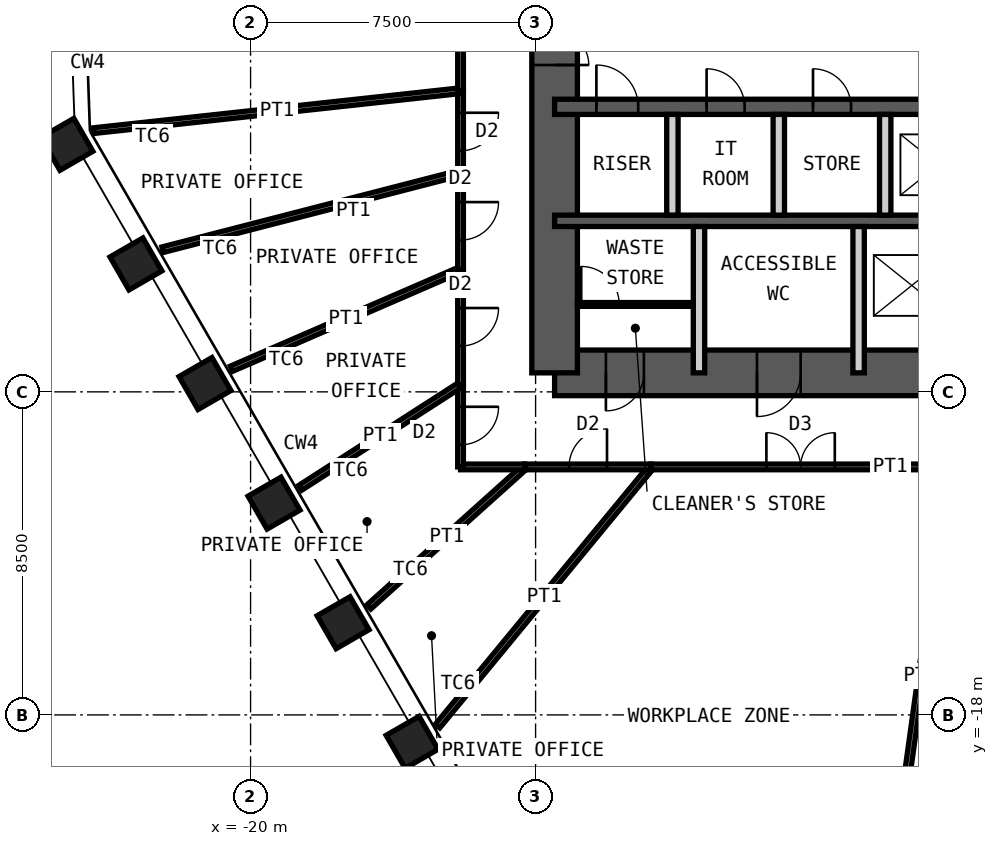
"""IFC4 building model, lengths in metres.
Left out: names, types, materials, properties, quantities, classifications, styles, units other than length and angle.
Written with IfcOpenShell. Run it as: python <this file> out.ifc"""

import sys

from ifc_helpers import new_model, si_unit, direction, frame, frame_2d, origin, origin_2d, place, context, subcontext, project, spatial, rectangle, hollow_rectangle, extrude, element, fill, save


model = new_model("IFC4")
c1 = context("Model", 3, precision=1e-05, world=origin(), true_north=direction((0.0, 1.0)))
c2 = subcontext(c1, "Body", "Model", "MODEL_VIEW")
j1 = project(units=[si_unit("LENGTHUNIT", "METRE"), si_unit("PLANEANGLEUNIT", "RADIAN")], contexts=[c1])
p1 = place(None, origin())
s1 = spatial("IfcSite", under=j1, at=p1, CompositionType="ELEMENT")
p2 = place(p1, origin())
s2 = spatial("IfcBuilding", under=s1, at=p2, CompositionType="ELEMENT")
p3 = place(p2, frame((0.0, 0.0, 235.0)))
s3 = spatial("IfcBuildingStorey", under=s2, at=p3, CompositionType="ELEMENT", Elevation=235.0)
for number, where, z_axis, x_axis in (
    (1, (-15.749, -18.721, 0.0), (0.0, 0.0, 1.0), (0.5, -0.866, 0.0)),
    (2, (-17.566, -15.574, 0.0), (0.0, 0.0, 1.0), (0.5, -0.866, 0.0)),
    (3, (-19.383, -12.428, 0.0), (0.0, 0.0, 1.0), (0.5, -0.866, 0.0)),
    (4, (-21.2, -9.281, 0.0), (0.0, 0.0, 1.0), (0.5, -0.866, 0.0)),
    (5, (-23.016, -6.134, 0.0), (0.0, 0.0, 1.0), (0.5, -0.866, 0.0)),
    (6, (-24.833, -2.988, 0.0), (0.0, 0.0, 1.0), (0.5, -0.866, 0.0)),
):
    element("IfcColumn", number, at=place(p3, frame(where, z_axis=z_axis, x_axis=x_axis)), inside=s3, PredefinedType="COLUMN", context=c2, shape_type="SweptSolid", body=[
        extrude(hollow_rectangle(XDim=1.0, YDim=1.0, WallThickness=0.06, at=origin_2d()), origin(), (0.0, 0.0, 1.0), 4.2),
    ])
p4 = place(p3, frame((-12.0, -9.0, 0.0), z_axis=(0.0, 0.0, 1.0), x_axis=(1.0, 0.0, 0.0)))
e7 = element("IfcWall", 7, at=p4, inside=s3, PredefinedType="SHEAR", context=c2, shape_type="SweptSolid", body=[
    extrude(rectangle(XDim=24.0, YDim=1.2, at=frame_2d((12.0, 0.0))), origin(), (0.0, 0.0, 1.0), 4.2),
])
p5 = place(p4, frame((1.35, 0.0, 0.0)))
e8 = element("IfcOpeningElement", 8, at=p5, cuts=e7, PredefinedType="OPENING", context=c2, shape_type="SweptSolid", body=[
    extrude(rectangle(XDim=1.0, YDim=2.1, at=frame_2d((0.5, 1.05))), frame((0.0, 0.61, 0.0), z_axis=(0.0, -1.0, 0.0), x_axis=(1.0, 0.0, 0.0)), (0.0, 0.0, 1.0), 1.22),
])
p6 = place(p4, frame((5.325, 0.0, 0.0)))
e9 = element("IfcOpeningElement", 9, at=p6, cuts=e7, PredefinedType="OPENING", context=c2, shape_type="SweptSolid", body=[
    extrude(rectangle(XDim=1.15, YDim=2.1, at=frame_2d((0.575, 1.05))), frame((0.0, 0.61, 0.0), z_axis=(0.0, -1.0, 0.0), x_axis=(1.0, 0.0, 0.0)), (0.0, 0.0, 1.0), 1.22),
])
p7 = place(p4, frame((12.6, 0.0, 0.0)))
e10 = element("IfcOpeningElement", 10, at=p7, cuts=e7, PredefinedType="OPENING", context=c2, shape_type="SweptSolid", body=[
    extrude(rectangle(XDim=1.0, YDim=2.1, at=frame_2d((0.5, 1.05))), frame((0.0, 0.61, 0.0), z_axis=(0.0, -1.0, 0.0), x_axis=(1.0, 0.0, 0.0)), (0.0, 0.0, 1.0), 1.22),
])
p8 = place(p3, frame((-12.0, -9.0, 0.0), z_axis=(0.0, 0.0, 1.0), x_axis=(0.0, 1.0, 0.0)))
e11 = element("IfcWall", 11, at=p8, inside=s3, PredefinedType="SHEAR", context=c2, shape_type="SweptSolid", body=[
    extrude(rectangle(XDim=18.0, YDim=1.2, at=frame_2d((9.0, 0.0))), origin(), (0.0, 0.0, 1.0), 4.2),
])
p9 = place(p8, frame((8.1, 0.0, 0.0)))
e12 = element("IfcOpeningElement", 12, at=p9, cuts=e11, PredefinedType="OPENING", context=c2, shape_type="SweptSolid", body=[
    extrude(rectangle(XDim=1.8, YDim=2.1, at=frame_2d((0.9, 1.05))), frame((0.0, 0.61, 0.0), z_axis=(0.0, -1.0, 0.0), x_axis=(1.0, 0.0, 0.0)), (0.0, 0.0, 1.0), 1.22),
])
p10 = place(p3, frame((-12.0, -2.0, 0.0), z_axis=(0.0, 0.0, 1.0), x_axis=(1.0, 0.0, 0.0)))
e13 = element("IfcWall", 13, at=p10, inside=s3, PredefinedType="SHEAR", context=c2, shape_type="SweptSolid", body=[
    extrude(rectangle(XDim=24.0, YDim=0.4, at=frame_2d((12.0, 0.0))), origin(), (0.0, 0.0, 1.0), 4.2),
])
p11 = place(p10, frame((1.1, 0.0, 0.0)))
e14 = element("IfcOpeningElement", 14, at=p11, cuts=e13, PredefinedType="OPENING", context=c2, shape_type="SweptSolid", body=[
    extrude(rectangle(XDim=1.1, YDim=2.1, at=frame_2d((0.55, 1.05))), frame((0.0, 0.21, 0.0), z_axis=(0.0, -1.0, 0.0), x_axis=(1.0, 0.0, 0.0)), (0.0, 0.0, 1.0), 0.42),
])
p12 = place(p10, frame((13.55, 0.0, 0.0)))
e15 = element("IfcOpeningElement", 15, at=p12, cuts=e13, PredefinedType="OPENING", context=c2, shape_type="SweptSolid", body=[
    extrude(rectangle(XDim=1.1, YDim=2.1, at=frame_2d((0.55, 1.05))), frame((0.0, 0.21, 0.0), z_axis=(0.0, -1.0, 0.0), x_axis=(1.0, 0.0, 0.0)), (0.0, 0.0, 1.0), 0.42),
])
p13 = place(p10, frame((20.7, 0.0, 0.0)))
e16 = element("IfcOpeningElement", 16, at=p13, cuts=e13, PredefinedType="OPENING", context=c2, shape_type="SweptSolid", body=[
    extrude(rectangle(XDim=1.1, YDim=2.1, at=frame_2d((0.55, 1.05))), frame((0.0, 0.21, 0.0), z_axis=(0.0, -1.0, 0.0), x_axis=(1.0, 0.0, 0.0)), (0.0, 0.0, 1.0), 0.42),
])
p14 = place(p10, frame((4.0, 0.0, 0.0)))
e17 = element("IfcOpeningElement", 17, at=p14, cuts=e13, PredefinedType="OPENING", context=c2, shape_type="SweptSolid", body=[
    extrude(rectangle(XDim=1.0, YDim=2.1, at=frame_2d((0.5, 1.05))), frame((0.0, 0.21, 0.0), z_axis=(0.0, -1.0, 0.0), x_axis=(1.0, 0.0, 0.0)), (0.0, 0.0, 1.0), 0.42),
])
p15 = place(p10, frame((6.8, 0.0, 0.0)))
e18 = element("IfcOpeningElement", 18, at=p15, cuts=e13, PredefinedType="OPENING", context=c2, shape_type="SweptSolid", body=[
    extrude(rectangle(XDim=1.0, YDim=2.1, at=frame_2d((0.5, 1.05))), frame((0.0, 0.21, 0.0), z_axis=(0.0, -1.0, 0.0), x_axis=(1.0, 0.0, 0.0)), (0.0, 0.0, 1.0), 0.42),
])
p16 = place(p3, frame((-12.0, -5.0, 0.0), z_axis=(0.0, 0.0, 1.0), x_axis=(1.0, 0.0, 0.0)))
e19 = element("IfcWall", 19, at=p16, inside=s3, PredefinedType="SHEAR", context=c2, shape_type="SweptSolid", body=[
    extrude(rectangle(XDim=24.0, YDim=0.3, at=frame_2d((12.0, 0.0))), origin(), (0.0, 0.0, 1.0), 4.2),
])
for number, where, z_axis, x_axis in (
    (20, (-8.9, -4.85, 0.0), (0.0, 0.0, 1.0), (0.0, 1.0, 0.0)),
    (21, (-6.1, -4.85, 0.0), (0.0, 0.0, 1.0), (0.0, 1.0, 0.0)),
    (22, (-3.3, -4.85, 0.0), (0.0, 0.0, 1.0), (0.0, 1.0, 0.0)),
):
    element("IfcWall", number, at=place(p3, frame(where, z_axis=z_axis, x_axis=x_axis)), inside=s3, PredefinedType="PARTITIONING", context=c2, shape_type="SweptSolid", body=[
        extrude(rectangle(XDim=2.65, YDim=0.3, at=frame_2d((1.325, 0.0))), origin(), (0.0, 0.0, 1.0), 3.98),
    ])
for number, where, z_axis, x_axis in (
    (23, (-8.2, -9.0, 0.0), (0.0, 0.0, 1.0), (0.0, 1.0, 0.0)),
    (24, (-4.0, -9.0, 0.0), (0.0, 0.0, 1.0), (0.0, 1.0, 0.0)),
):
    element("IfcWall", number, at=place(p3, frame(where, z_axis=z_axis, x_axis=x_axis)), inside=s3, PredefinedType="PARTITIONING", context=c2, shape_type="SweptSolid", body=[
        extrude(rectangle(XDim=3.85, YDim=0.3, at=frame_2d((1.925, 0.0))), origin(), (0.0, 0.0, 1.0), 3.98),
    ])
p17 = place(p3, frame((-11.4, -7.2, 0.0), z_axis=(0.0, 0.0, 1.0), x_axis=(1.0, 0.0, 0.0)))
e25 = element("IfcWall", 25, at=p17, inside=s3, PredefinedType="PARTITIONING", context=c2, shape_type="SweptSolid", body=[
    extrude(rectangle(XDim=3.05, YDim=0.1, at=frame_2d((1.525, 0.0))), origin(), (0.0, 0.0, 1.0), 3.98),
])
p18 = place(p17, frame((0.1, 0.0, 0.0)))
e26 = element("IfcOpeningElement", 26, at=p18, cuts=e25, PredefinedType="OPENING", context=c2, shape_type="SweptSolid", body=[
    extrude(rectangle(XDim=1.0, YDim=2.4, at=frame_2d((0.5, 1.2))), frame((0.0, 0.06, 0.0), z_axis=(0.0, -1.0, 0.0), x_axis=(1.0, 0.0, 0.0)), (0.0, 0.0, 1.0), 0.12),
])
p19 = place(p3, frame((-15.08, -18.294, 0.0), z_axis=(0.0, 0.0, 1.0), x_axis=(0.636052894953, 0.771645459277, 0.0)))
e27 = element("IfcWall", 27, at=p19, inside=s3, PredefinedType="PARTITIONING", context=c2, shape_type="SweptSolid", body=[
    extrude(rectangle(XDim=8.837, YDim=0.15, at=frame_2d((4.418, 0.0))), origin(), (0.0, 0.0, 1.0), 3.43),
])
p20 = place(p3, frame((-9.459, -11.475, 0.0), z_axis=(0.0, 0.0, 1.0), x_axis=(-1.0, 0.0, 0.0)))
e28 = element("IfcWall", 28, at=p20, inside=s3, PredefinedType="PARTITIONING", context=c2, shape_type="SweptSolid", body=[
    extrude(rectangle(XDim=3.324, YDim=0.15, at=frame_2d((1.662, 0.0))), origin(), (0.0, 0.0, 1.0), 4.03),
])
p21 = place(p20, frame((1.162, 0.0, 0.0)))
e29 = element("IfcOpeningElement", 29, at=p21, cuts=e28, PredefinedType="OPENING", context=c2, shape_type="SweptSolid", body=[
    extrude(rectangle(XDim=1.0, YDim=2.4, at=frame_2d((0.5, 1.2))), frame((0.0, 0.085, 0.0), z_axis=(0.0, -1.0, 0.0), x_axis=(1.0, 0.0, 0.0)), (0.0, 0.0, 1.0), 0.17),
])
p22 = place(p3, frame((-16.885, -15.158, 0.0), z_axis=(0.0, 0.0, 1.0), x_axis=(0.744165513773, 0.667995275515, 0.0)))
e30 = element("IfcWall", 30, at=p22, inside=s3, PredefinedType="PARTITIONING", context=c2, shape_type="SweptSolid", body=[
    extrude(rectangle(XDim=5.513, YDim=0.15, at=frame_2d((2.756, 0.0))), origin(), (0.0, 0.0, 1.0), 3.43),
])
p23 = place(p3, frame((-12.783, -11.475, 0.0), z_axis=(0.0, 0.0, 1.0), x_axis=(-1.0, 0.0, 0.0)))
e31 = element("IfcWall", 31, at=p23, inside=s3, PredefinedType="PARTITIONING", context=c2, shape_type="SweptSolid", body=[
    extrude(rectangle(XDim=1.692, YDim=0.15, at=frame_2d((0.846, 0.0))), origin(), (0.0, 0.0, 1.0), 4.03),
])
p24 = place(p3, frame((-14.475, -11.475, 0.0), z_axis=(0.0, 0.0, 1.0), x_axis=(0.0, 1.0, 0.0)))
e32 = element("IfcWall", 32, at=p24, inside=s3, PredefinedType="PARTITIONING", context=c2, shape_type="SweptSolid", body=[
    extrude(rectangle(XDim=2.164, YDim=0.15, at=frame_2d((1.082, 0.0))), origin(), (0.0, 0.0, 1.0), 4.03),
])
p25 = place(p24, frame((0.582, 0.0, 0.0)))
e33 = element("IfcOpeningElement", 33, at=p25, cuts=e32, PredefinedType="OPENING", context=c2, shape_type="SweptSolid", body=[
    extrude(rectangle(XDim=1.0, YDim=2.4, at=frame_2d((0.5, 1.2))), frame((0.0, 0.085, 0.0), z_axis=(0.0, -1.0, 0.0), x_axis=(1.0, 0.0, 0.0)), (0.0, 0.0, 1.0), 0.17),
])
p26 = place(p3, frame((-18.693, -12.024, 0.0), z_axis=(0.0, 0.0, 1.0), x_axis=(0.841031335058, 0.540986407824, 0.0)))
e34 = element("IfcWall", 34, at=p26, inside=s3, PredefinedType="PARTITIONING", context=c2, shape_type="SweptSolid", body=[
    extrude(rectangle(XDim=5.015, YDim=0.15, at=frame_2d((2.507, 0.0))), origin(), (0.0, 0.0, 1.0), 3.43),
])
p27 = place(p3, frame((-14.475, -9.311, 0.0), z_axis=(0.0, 0.0, 1.0), x_axis=(0.0, 1.0, 0.0)))
e35 = element("IfcWall", 35, at=p27, inside=s3, PredefinedType="PARTITIONING", context=c2, shape_type="SweptSolid", body=[
    extrude(rectangle(XDim=3.033, YDim=0.15, at=frame_2d((1.517, 0.0))), origin(), (0.0, 0.0, 1.0), 4.03),
])
p28 = place(p27, frame((1.017, 0.0, 0.0)))
e36 = element("IfcOpeningElement", 36, at=p28, cuts=e35, PredefinedType="OPENING", context=c2, shape_type="SweptSolid", body=[
    extrude(rectangle(XDim=1.0, YDim=2.4, at=frame_2d((0.5, 1.2))), frame((0.0, 0.085, 0.0), z_axis=(0.0, -1.0, 0.0), x_axis=(1.0, 0.0, 0.0)), (0.0, 0.0, 1.0), 0.17),
])
p29 = place(p3, frame((-20.502, -8.891, 0.0), z_axis=(0.0, 0.0, 1.0), x_axis=(0.917431289744, 0.397894242982, 0.0)))
e37 = element("IfcWall", 37, at=p29, inside=s3, PredefinedType="PARTITIONING", context=c2, shape_type="SweptSolid", body=[
    extrude(rectangle(XDim=6.569, YDim=0.15, at=frame_2d((3.285, 0.0))), origin(), (0.0, 0.0, 1.0), 3.43),
])
p30 = place(p3, frame((-14.475, -6.278, 0.0), z_axis=(0.0, 0.0, 1.0), x_axis=(0.0, 1.0, 0.0)))
e38 = element("IfcWall", 38, at=p30, inside=s3, PredefinedType="PARTITIONING", context=c2, shape_type="SweptSolid", body=[
    extrude(rectangle(XDim=2.542, YDim=0.15, at=frame_2d((1.271, 0.0))), origin(), (0.0, 0.0, 1.0), 4.03),
])
p31 = place(p30, frame((0.771, 0.0, 0.0)))
e39 = element("IfcOpeningElement", 39, at=p31, cuts=e38, PredefinedType="OPENING", context=c2, shape_type="SweptSolid", body=[
    extrude(rectangle(XDim=1.0, YDim=2.4, at=frame_2d((0.5, 1.2))), frame((0.0, 0.085, 0.0), z_axis=(0.0, -1.0, 0.0), x_axis=(1.0, 0.0, 0.0)), (0.0, 0.0, 1.0), 0.17),
])
p32 = place(p3, frame((-22.313, -5.759, 0.0), z_axis=(0.0, 0.0, 1.0), x_axis=(0.968265788926, 0.249922712042, 0.0)))
e40 = element("IfcWall", 40, at=p32, inside=s3, PredefinedType="PARTITIONING", context=c2, shape_type="SweptSolid", body=[
    extrude(rectangle(XDim=8.095, YDim=0.15, at=frame_2d((4.048, 0.0))), origin(), (0.0, 0.0, 1.0), 3.43),
])
p33 = place(p3, frame((-14.475, -3.736, 0.0), z_axis=(0.0, 0.0, 1.0), x_axis=(0.0, 1.0, 0.0)))
e41 = element("IfcWall", 41, at=p33, inside=s3, PredefinedType="PARTITIONING", context=c2, shape_type="SweptSolid", body=[
    extrude(rectangle(XDim=2.16, YDim=0.15, at=frame_2d((1.08, 0.0))), origin(), (0.0, 0.0, 1.0), 4.03),
])
p34 = place(p33, frame((0.58, 0.0, 0.0)))
e42 = element("IfcOpeningElement", 42, at=p34, cuts=e41, PredefinedType="OPENING", context=c2, shape_type="SweptSolid", body=[
    extrude(rectangle(XDim=1.0, YDim=2.4, at=frame_2d((0.5, 1.2))), frame((0.0, 0.085, 0.0), z_axis=(0.0, -1.0, 0.0), x_axis=(1.0, 0.0, 0.0)), (0.0, 0.0, 1.0), 0.17),
])
p35 = place(p3, frame((-24.128, -2.627, 0.0), z_axis=(0.0, 0.0, 1.0), x_axis=(0.994126892449, 0.108220708326, 0.0)))
e43 = element("IfcWall", 43, at=p35, inside=s3, PredefinedType="PARTITIONING", context=c2, shape_type="SweptSolid", body=[
    extrude(rectangle(XDim=9.71, YDim=0.15, at=frame_2d((4.855, 0.0))), origin(), (0.0, 0.0, 1.0), 2.93),
])
p36 = place(p3, frame((-14.475, -1.576, 0.0), z_axis=(0.0, 0.0, 1.0), x_axis=(0.0, 1.0, 0.0)))
e44 = element("IfcWall", 44, at=p36, inside=s3, PredefinedType="PARTITIONING", context=c2, shape_type="SweptSolid", body=[
    extrude(rectangle(XDim=4.252, YDim=0.15, at=frame_2d((2.126, 0.0))), origin(), (0.0, 0.0, 1.0), 4.03),
])
p37 = place(p36, frame((1.626, 0.0, 0.0)))
e45 = element("IfcOpeningElement", 45, at=p37, cuts=e44, PredefinedType="OPENING", context=c2, shape_type="SweptSolid", body=[
    extrude(rectangle(XDim=1.0, YDim=2.4, at=frame_2d((0.5, 1.2))), frame((0.0, 0.085, 0.0), z_axis=(0.0, -1.0, 0.0), x_axis=(1.0, 0.0, 0.0)), (0.0, 0.0, 1.0), 0.17),
])
p38 = place(p3, frame((-3.124, -22.475, 0.0), z_axis=(0.0, 0.0, 1.0), x_axis=(0.137683997015, 0.990476207168, 0.0)))
e46 = element("IfcWall", 46, at=p38, inside=s3, PredefinedType="PARTITIONING", context=c2, shape_type="SweptSolid", body=[
    extrude(rectangle(XDim=11.105, YDim=0.15, at=frame_2d((5.553, 0.0))), origin(), (0.0, 0.0, 1.0), 3.43),
])
p39 = place(p3, frame((-1.595, -11.475, 0.0), z_axis=(0.0, 0.0, 1.0), x_axis=(-1.0, 0.0, 0.0)))
e47 = element("IfcWall", 47, at=p39, inside=s3, PredefinedType="PARTITIONING", context=c2, shape_type="SweptSolid", body=[
    extrude(rectangle(XDim=7.864, YDim=0.15, at=frame_2d((3.932, 0.0))), origin(), (0.0, 0.0, 1.0), 4.03),
])
p40 = place(p39, frame((3.032, 0.0, 0.0)))
e48 = element("IfcOpeningElement", 48, at=p40, cuts=e47, PredefinedType="OPENING", context=c2, shape_type="SweptSolid", body=[
    extrude(rectangle(XDim=1.8, YDim=2.4, at=frame_2d((0.9, 1.2))), frame((0.0, 0.085, 0.0), z_axis=(0.0, -1.0, 0.0), x_axis=(1.0, 0.0, 0.0)), (0.0, 0.0, 1.0), 0.17),
])
p41 = place(p5, origin())
e49 = element("IfcDoor", 49, at=p41, inside=s3, OperationType="SINGLE_SWING_LEFT", PredefinedType="DOOR", context=c2, shape_type="SweptSolid", body=[
    extrude(rectangle(XDim=1.0, YDim=2.1, at=frame_2d((0.5, 1.05))), frame((0.0, 0.025, 0.0), z_axis=(0.0, -1.0, 0.0), x_axis=(1.0, 0.0, 0.0)), (0.0, 0.0, 1.0), 0.05),
])
fill(e8, e49)
p42 = place(p6, origin())
e50 = element("IfcDoor", 50, at=p42, inside=s3, OperationType="SINGLE_SWING_LEFT", PredefinedType="DOOR", context=c2, shape_type="SweptSolid", body=[
    extrude(rectangle(XDim=1.15, YDim=2.1, at=frame_2d((0.575, 1.05))), frame((0.0, 0.025, 0.0), z_axis=(0.0, -1.0, 0.0), x_axis=(1.0, 0.0, 0.0)), (0.0, 0.0, 1.0), 0.05),
])
fill(e9, e50)
p43 = place(p11, origin())
e51 = element("IfcDoor", 51, at=p43, inside=s3, OperationType="SINGLE_SWING_RIGHT", PredefinedType="DOOR", context=c2, shape_type="SweptSolid", body=[
    extrude(rectangle(XDim=1.1, YDim=2.1, at=frame_2d((0.55, 1.05))), frame((0.0, 0.025, 0.0), z_axis=(0.0, -1.0, 0.0), x_axis=(1.0, 0.0, 0.0)), (0.0, 0.0, 1.0), 0.05),
])
fill(e14, e51)
p44 = place(p9, origin())
e52 = element("IfcDoor", 52, at=p44, inside=s3, OperationType="DOUBLE_DOOR_DOUBLE_SWING", PredefinedType="DOOR", context=c2, shape_type="SweptSolid", body=[
    extrude(rectangle(XDim=1.8, YDim=2.1, at=frame_2d((0.9, 1.05))), frame((0.0, 0.025, 0.0), z_axis=(0.0, -1.0, 0.0), x_axis=(1.0, 0.0, 0.0)), (0.0, 0.0, 1.0), 0.05),
])
fill(e12, e52)
p45 = place(p14, origin())
e53 = element("IfcDoor", 53, at=p45, inside=s3, OperationType="SINGLE_SWING_RIGHT", PredefinedType="DOOR", context=c2, shape_type="SweptSolid", body=[
    extrude(rectangle(XDim=1.0, YDim=2.1, at=frame_2d((0.5, 1.05))), frame((0.0, 0.025, 0.0), z_axis=(0.0, -1.0, 0.0), x_axis=(1.0, 0.0, 0.0)), (0.0, 0.0, 1.0), 0.05),
])
fill(e17, e53)
p46 = place(p15, origin())
e54 = element("IfcDoor", 54, at=p46, inside=s3, OperationType="SINGLE_SWING_RIGHT", PredefinedType="DOOR", context=c2, shape_type="SweptSolid", body=[
    extrude(rectangle(XDim=1.0, YDim=2.1, at=frame_2d((0.5, 1.05))), frame((0.0, 0.025, 0.0), z_axis=(0.0, -1.0, 0.0), x_axis=(1.0, 0.0, 0.0)), (0.0, 0.0, 1.0), 0.05),
])
fill(e18, e54)
p47 = place(p18, origin())
e55 = element("IfcDoor", 55, at=p47, inside=s3, OperationType="SINGLE_SWING_RIGHT", PredefinedType="DOOR", context=c2, shape_type="SweptSolid", body=[
    extrude(rectangle(XDim=1.0, YDim=2.4, at=frame_2d((0.5, 1.2))), frame((0.0, 0.025, 0.0), z_axis=(0.0, -1.0, 0.0), x_axis=(1.0, 0.0, 0.0)), (0.0, 0.0, 1.0), 0.05),
])
fill(e26, e55)
p48 = place(p21, origin())
e56 = element("IfcDoor", 56, at=p48, inside=s3, OperationType="SINGLE_SWING_LEFT", PredefinedType="DOOR", context=c2, shape_type="SweptSolid", body=[
    extrude(rectangle(XDim=1.0, YDim=2.4, at=frame_2d((0.5, 1.2))), frame((0.0, 0.025, 0.0), z_axis=(0.0, -1.0, 0.0), x_axis=(1.0, 0.0, 0.0)), (0.0, 0.0, 1.0), 0.05),
])
fill(e29, e56)
p49 = place(p25, origin())
e57 = element("IfcDoor", 57, at=p49, inside=s3, OperationType="SINGLE_SWING_RIGHT", PredefinedType="DOOR", context=c2, shape_type="SweptSolid", body=[
    extrude(rectangle(XDim=1.0, YDim=2.4, at=frame_2d((0.5, 1.2))), frame((0.0, 0.025, 0.0), z_axis=(0.0, -1.0, 0.0), x_axis=(1.0, 0.0, 0.0)), (0.0, 0.0, 1.0), 0.05),
])
fill(e33, e57)
p50 = place(p28, origin())
e58 = element("IfcDoor", 58, at=p50, inside=s3, OperationType="SINGLE_SWING_RIGHT", PredefinedType="DOOR", context=c2, shape_type="SweptSolid", body=[
    extrude(rectangle(XDim=1.0, YDim=2.4, at=frame_2d((0.5, 1.2))), frame((0.0, 0.025, 0.0), z_axis=(0.0, -1.0, 0.0), x_axis=(1.0, 0.0, 0.0)), (0.0, 0.0, 1.0), 0.05),
])
fill(e36, e58)
p51 = place(p31, origin())
e59 = element("IfcDoor", 59, at=p51, inside=s3, OperationType="SINGLE_SWING_RIGHT", PredefinedType="DOOR", context=c2, shape_type="SweptSolid", body=[
    extrude(rectangle(XDim=1.0, YDim=2.4, at=frame_2d((0.5, 1.2))), frame((0.0, 0.025, 0.0), z_axis=(0.0, -1.0, 0.0), x_axis=(1.0, 0.0, 0.0)), (0.0, 0.0, 1.0), 0.05),
])
fill(e39, e59)
p52 = place(p34, origin())
e60 = element("IfcDoor", 60, at=p52, inside=s3, OperationType="SINGLE_SWING_RIGHT", PredefinedType="DOOR", context=c2, shape_type="SweptSolid", body=[
    extrude(rectangle(XDim=1.0, YDim=2.4, at=frame_2d((0.5, 1.2))), frame((0.0, 0.025, 0.0), z_axis=(0.0, -1.0, 0.0), x_axis=(1.0, 0.0, 0.0)), (0.0, 0.0, 1.0), 0.05),
])
fill(e42, e60)
p53 = place(p40, origin())
e61 = element("IfcDoor", 61, at=p53, inside=s3, OperationType="DOUBLE_DOOR_DOUBLE_SWING", PredefinedType="DOOR", context=c2, shape_type="SweptSolid", body=[
    extrude(rectangle(XDim=1.8, YDim=2.4, at=frame_2d((0.9, 1.2))), frame((0.0, 0.025, 0.0), z_axis=(0.0, -1.0, 0.0), x_axis=(1.0, 0.0, 0.0)), (0.0, 0.0, 1.0), 0.05),
])
fill(e48, e61)
save(model, sys.argv[1])
